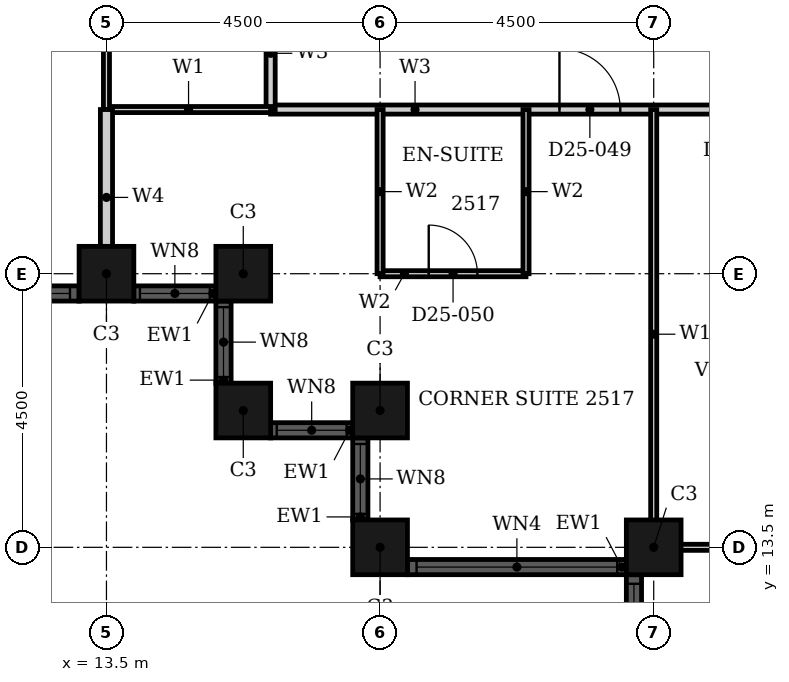
"""IFC4 building model, lengths in metres.
Left out: names, types, materials, properties, quantities, classifications, styles, units other than length and angle.
Written with IfcOpenShell. Run it as: python <this file> out.ifc"""

import sys

from ifc_helpers import new_model, si_unit, direction, frame, frame_2d, origin, origin_2d, place, context, subcontext, project, spatial, rectangle, hollow_rectangle, extrude, element, fill, save


model = new_model("IFC4")
c1 = context("Model", 3, precision=1e-05, world=origin(), true_north=direction((0.0, 1.0)))
c2 = subcontext(c1, "Body", "Model", "MODEL_VIEW")
j1 = project(units=[si_unit("LENGTHUNIT", "METRE"), si_unit("PLANEANGLEUNIT", "RADIAN")], contexts=[c1])
p1 = place(None, origin())
s1 = spatial("IfcSite", under=j1, at=p1, CompositionType="ELEMENT")
p2 = place(p1, origin())
s2 = spatial("IfcBuilding", under=s1, at=p2, CompositionType="ELEMENT")
p3 = place(p2, frame((0.0, 0.0, 104.4)))
s3 = spatial("IfcBuildingStorey", under=s2, at=p3, CompositionType="ELEMENT", Elevation=104.4)
for number, where, z_axis, x_axis in (
    (1, (13.5, 18.0, 0.0), (0.0, 0.0, 1.0), (1.0, 0.0, 0.0)),
    (2, (15.75, 18.0, 0.0), (0.0, 0.0, 1.0), (1.0, 0.0, 0.0)),
    (3, (15.75, 15.75, 0.0), (0.0, 0.0, 1.0), (1.0, 0.0, 0.0)),
    (4, (18.0, 15.75, 0.0), (0.0, 0.0, 1.0), (1.0, 0.0, 0.0)),
    (5, (18.0, 13.5, 0.0), (0.0, 0.0, 1.0), (1.0, 0.0, 0.0)),
    (6, (22.5, 13.5, 0.0), (0.0, 0.0, 1.0), (1.0, 0.0, 0.0)),
):
    element("IfcColumn", number, at=place(p3, frame(where, z_axis=z_axis, x_axis=x_axis)), inside=s3, PredefinedType="COLUMN", context=c2, shape_type="SweptSolid", body=[
        extrude(hollow_rectangle(XDim=0.9, YDim=0.9, WallThickness=0.028, at=origin_2d()), origin(), (0.0, 0.0, 1.0), 3.6),
    ])
p4 = place(p3, frame((4.95, 17.675, 0.0), z_axis=(0.0, 0.0, 1.0), x_axis=(1.0, 0.0, 0.0)))
e7 = element("IfcWall", 7, at=p4, inside=s3, PredefinedType="SOLIDWALL", context=c2, shape_type="SweptSolid", body=[
    extrude(rectangle(XDim=8.1, YDim=0.25, at=frame_2d((4.05, 0.0))), origin(), (0.0, 0.0, 1.0), 3.6),
])
p5 = place(p4, frame((0.15, 0.0, 0.9)))
e8 = element("IfcOpeningElement", 8, at=p5, cuts=e7, PredefinedType="OPENING", context=c2, shape_type="SweptSolid", body=[
    extrude(rectangle(XDim=3.3, YDim=2.08, at=frame_2d((1.65, 1.04))), frame((0.0, 0.135, 0.0), z_axis=(0.0, -1.0, 0.0), x_axis=(1.0, 0.0, 0.0)), (0.0, 0.0, 1.0), 0.27),
])
p6 = place(p4, frame((4.65, 0.0, 0.9)))
e9 = element("IfcOpeningElement", 9, at=p6, cuts=e7, PredefinedType="OPENING", context=c2, shape_type="SweptSolid", body=[
    extrude(rectangle(XDim=3.3, YDim=2.08, at=frame_2d((1.65, 1.04))), frame((0.0, 0.135, 0.0), z_axis=(0.0, -1.0, 0.0), x_axis=(1.0, 0.0, 0.0)), (0.0, 0.0, 1.0), 0.27),
])
p7 = place(p3, frame((13.95, 17.675, 0.0), z_axis=(0.0, 0.0, 1.0), x_axis=(1.0, 0.0, 0.0)))
e10 = element("IfcWall", 10, at=p7, inside=s3, PredefinedType="SOLIDWALL", context=c2, shape_type="SweptSolid", body=[
    extrude(rectangle(XDim=1.35, YDim=0.25, at=frame_2d((0.675, 0.0))), origin(), (0.0, 0.0, 1.0), 3.6),
])
p8 = place(p7, frame((0.1, 0.0, 0.9)))
e11 = element("IfcOpeningElement", 11, at=p8, cuts=e10, PredefinedType="OPENING", context=c2, shape_type="SweptSolid", body=[
    extrude(rectangle(XDim=1.15, YDim=2.08, at=frame_2d((0.575, 1.04))), frame((0.0, 0.135, 0.0), z_axis=(0.0, -1.0, 0.0), x_axis=(1.0, 0.0, 0.0)), (0.0, 0.0, 1.0), 0.27),
])
p9 = place(p3, frame((15.425, 17.55, 0.0), z_axis=(0.0, 0.0, 1.0), x_axis=(0.0, -1.0, 0.0)))
e12 = element("IfcWall", 12, at=p9, inside=s3, PredefinedType="SOLIDWALL", context=c2, shape_type="SweptSolid", body=[
    extrude(rectangle(XDim=1.35, YDim=0.25, at=frame_2d((0.675, 0.0))), origin(), (0.0, 0.0, 1.0), 3.6),
])
p10 = place(p9, frame((0.1, 0.0, 0.9)))
e13 = element("IfcOpeningElement", 13, at=p10, cuts=e12, PredefinedType="OPENING", context=c2, shape_type="SweptSolid", body=[
    extrude(rectangle(XDim=1.15, YDim=2.08, at=frame_2d((0.575, 1.04))), frame((0.0, 0.135, 0.0), z_axis=(0.0, -1.0, 0.0), x_axis=(1.0, 0.0, 0.0)), (0.0, 0.0, 1.0), 0.27),
])
p11 = place(p3, frame((16.2, 15.425, 0.0), z_axis=(0.0, 0.0, 1.0), x_axis=(1.0, 0.0, 0.0)))
e14 = element("IfcWall", 14, at=p11, inside=s3, PredefinedType="SOLIDWALL", context=c2, shape_type="SweptSolid", body=[
    extrude(rectangle(XDim=1.35, YDim=0.25, at=frame_2d((0.675, 0.0))), origin(), (0.0, 0.0, 1.0), 3.6),
])
p12 = place(p11, frame((0.1, 0.0, 0.9)))
e15 = element("IfcOpeningElement", 15, at=p12, cuts=e14, PredefinedType="OPENING", context=c2, shape_type="SweptSolid", body=[
    extrude(rectangle(XDim=1.15, YDim=2.08, at=frame_2d((0.575, 1.04))), frame((0.0, 0.135, 0.0), z_axis=(0.0, -1.0, 0.0), x_axis=(1.0, 0.0, 0.0)), (0.0, 0.0, 1.0), 0.27),
])
p13 = place(p3, frame((17.675, 15.3, 0.0), z_axis=(0.0, 0.0, 1.0), x_axis=(0.0, -1.0, 0.0)))
e16 = element("IfcWall", 16, at=p13, inside=s3, PredefinedType="SOLIDWALL", context=c2, shape_type="SweptSolid", body=[
    extrude(rectangle(XDim=1.35, YDim=0.25, at=frame_2d((0.675, 0.0))), origin(), (0.0, 0.0, 1.0), 3.6),
])
p14 = place(p13, frame((0.1, 0.0, 0.9)))
e17 = element("IfcOpeningElement", 17, at=p14, cuts=e16, PredefinedType="OPENING", context=c2, shape_type="SweptSolid", body=[
    extrude(rectangle(XDim=1.15, YDim=2.08, at=frame_2d((0.575, 1.04))), frame((0.0, 0.135, 0.0), z_axis=(0.0, -1.0, 0.0), x_axis=(1.0, 0.0, 0.0)), (0.0, 0.0, 1.0), 0.27),
])
p15 = place(p3, frame((18.45, 13.175, 0.0), z_axis=(0.0, 0.0, 1.0), x_axis=(1.0, 0.0, 0.0)))
e18 = element("IfcWall", 18, at=p15, inside=s3, PredefinedType="SOLIDWALL", context=c2, shape_type="SweptSolid", body=[
    extrude(rectangle(XDim=3.6, YDim=0.25, at=frame_2d((1.8, 0.0))), origin(), (0.0, 0.0, 1.0), 3.6),
])
p16 = place(p15, frame((0.15, 0.0, 0.9)))
e19 = element("IfcOpeningElement", 19, at=p16, cuts=e18, PredefinedType="OPENING", context=c2, shape_type="SweptSolid", body=[
    extrude(rectangle(XDim=3.3, YDim=2.08, at=frame_2d((1.65, 1.04))), frame((0.0, 0.135, 0.0), z_axis=(0.0, -1.0, 0.0), x_axis=(1.0, 0.0, 0.0)), (0.0, 0.0, 1.0), 0.27),
])
p17 = place(p3, frame((22.175, 13.05, 0.0), z_axis=(0.0, 0.0, 1.0), x_axis=(0.0, -1.0, 0.0)))
e20 = element("IfcWall", 20, at=p17, inside=s3, PredefinedType="SOLIDWALL", context=c2, shape_type="SweptSolid", body=[
    extrude(rectangle(XDim=8.1, YDim=0.25, at=frame_2d((4.05, 0.0))), origin(), (0.0, 0.0, 1.0), 3.6),
])
p18 = place(p17, frame((0.15, 0.0, 0.9)))
e21 = element("IfcOpeningElement", 21, at=p18, cuts=e20, PredefinedType="OPENING", context=c2, shape_type="SweptSolid", body=[
    extrude(rectangle(XDim=3.3, YDim=2.08, at=frame_2d((1.65, 1.04))), frame((0.0, 0.135, 0.0), z_axis=(0.0, -1.0, 0.0), x_axis=(1.0, 0.0, 0.0)), (0.0, 0.0, 1.0), 0.27),
])
p19 = place(p17, frame((4.65, 0.0, 0.9)))
e22 = element("IfcOpeningElement", 22, at=p19, cuts=e20, PredefinedType="OPENING", context=c2, shape_type="SweptSolid", body=[
    extrude(rectangle(XDim=3.3, YDim=2.08, at=frame_2d((1.65, 1.04))), frame((0.0, 0.135, 0.0), z_axis=(0.0, -1.0, 0.0), x_axis=(1.0, 0.0, 0.0)), (0.0, 0.0, 1.0), 0.27),
])
p20 = place(p3, frame((16.2, 20.7, 0.0), z_axis=(0.0, 0.0, 1.0), x_axis=(1.0, 0.0, 0.0)))
e23 = element("IfcWall", 23, at=p20, inside=s3, PredefinedType="PARTITIONING", context=c2, shape_type="SweptSolid", body=[
    extrude(rectangle(XDim=13.5, YDim=0.15, at=frame_2d((6.75, 0.0))), origin(), (0.0, 0.0, 1.0), 3.3),
])
p21 = place(p20, frame((4.75, 0.0, 0.0)))
e24 = element("IfcOpeningElement", 24, at=p21, cuts=e23, PredefinedType="OPENING", context=c2, shape_type="SweptSolid", body=[
    extrude(rectangle(XDim=1.0, YDim=2.1, at=frame_2d((0.5, 1.05))), frame((0.0, 0.085, 0.0), z_axis=(0.0, -1.0, 0.0), x_axis=(1.0, 0.0, 0.0)), (0.0, 0.0, 1.0), 0.17),
])
p22 = place(p20, frame((7.35, 0.0, 0.0)))
e25 = element("IfcOpeningElement", 25, at=p22, cuts=e23, PredefinedType="OPENING", context=c2, shape_type="SweptSolid", body=[
    extrude(rectangle(XDim=0.9, YDim=2.1, at=frame_2d((0.45, 1.05))), frame((0.0, 0.085, 0.0), z_axis=(0.0, -1.0, 0.0), x_axis=(1.0, 0.0, 0.0)), (0.0, 0.0, 1.0), 0.17),
])
p23 = place(p20, frame((10.95, 0.0, 0.0)))
e26 = element("IfcOpeningElement", 26, at=p23, cuts=e23, PredefinedType="OPENING", context=c2, shape_type="SweptSolid", body=[
    extrude(rectangle(XDim=0.9, YDim=2.1, at=frame_2d((0.45, 1.05))), frame((0.0, 0.085, 0.0), z_axis=(0.0, -1.0, 0.0), x_axis=(1.0, 0.0, 0.0)), (0.0, 0.0, 1.0), 0.17),
])
p24 = place(p3, frame((16.2, 20.7, 0.0), z_axis=(0.0, 0.0, 1.0), x_axis=(0.0, 1.0, 0.0)))
e27 = element("IfcWall", 27, at=p24, inside=s3, PredefinedType="PARTITIONING", context=c2, shape_type="SweptSolid", body=[
    extrude(rectangle(XDim=4.5, YDim=0.15, at=frame_2d((2.25, 0.0))), origin(), (0.0, 0.0, 1.0), 3.3),
])
p25 = place(p24, frame((1.85, 0.0, 0.0)))
e28 = element("IfcOpeningElement", 28, at=p25, cuts=e27, PredefinedType="OPENING", context=c2, shape_type="SweptSolid", body=[
    extrude(rectangle(XDim=0.9, YDim=2.1, at=frame_2d((0.45, 1.05))), frame((0.0, 0.085, 0.0), z_axis=(0.0, -1.0, 0.0), x_axis=(1.0, 0.0, 0.0)), (0.0, 0.0, 1.0), 0.17),
])
p26 = place(p3, frame((22.31, 13.5, 0.0), z_axis=(0.0, 0.0, 1.0), x_axis=(1.0, 0.0, 0.0)))
e29 = element("IfcWall", 29, at=p26, inside=s3, PredefinedType="PARTITIONING", context=c2, shape_type="SweptSolid", body=[
    extrude(rectangle(XDim=7.39, YDim=0.1, at=frame_2d((3.695, 0.0))), origin(), (0.0, 0.0, 1.0), 2.38),
])
p27 = place(p3, frame((13.5, 20.7, 0.0), z_axis=(0.0, 0.0, 1.0), x_axis=(1.0, 0.0, 0.0)))
e30 = element("IfcWall", 30, at=p27, inside=s3, PredefinedType="PARTITIONING", context=c2, shape_type="SweptSolid", body=[
    extrude(rectangle(XDim=2.7, YDim=0.1, at=frame_2d((1.35, 0.0))), origin(), (0.0, 0.0, 1.0), 3.3),
])
p28 = place(p3, frame((13.5, 20.7, 0.0), z_axis=(0.0, 0.0, 1.0), x_axis=(0.0, 1.0, 0.0)))
e31 = element("IfcWall", 31, at=p28, inside=s3, PredefinedType="PARTITIONING", context=c2, shape_type="SweptSolid", body=[
    extrude(rectangle(XDim=4.5, YDim=0.1, at=frame_2d((2.25, 0.0))), origin(), (0.0, 0.0, 1.0), 2.38),
])
p29 = place(p3, frame((22.5, 13.31, 0.0), z_axis=(0.0, 0.0, 1.0), x_axis=(0.0, 1.0, 0.0)))
e32 = element("IfcWall", 32, at=p29, inside=s3, PredefinedType="PARTITIONING", context=c2, shape_type="SweptSolid", body=[
    extrude(rectangle(XDim=7.39, YDim=0.1, at=frame_2d((3.695, 0.0))), origin(), (0.0, 0.0, 1.0), 3.3),
])
p30 = place(p3, frame((13.5, 17.81, 0.0), z_axis=(0.0, 0.0, 1.0), x_axis=(0.0, 1.0, 0.0)))
e33 = element("IfcWall", 33, at=p30, inside=s3, PredefinedType="PARTITIONING", context=c2, shape_type="SweptSolid", body=[
    extrude(rectangle(XDim=2.89, YDim=0.2, at=frame_2d((1.445, 0.0))), origin(), (0.0, 0.0, 1.0), 2.38),
])
p31 = place(p3, frame((18.0, 18.0, 0.0), z_axis=(0.0, 0.0, 1.0), x_axis=(1.0, 0.0, 0.0)))
e34 = element("IfcWall", 34, at=p31, inside=s3, PredefinedType="PARTITIONING", context=c2, shape_type="SweptSolid", body=[
    extrude(rectangle(XDim=2.4, YDim=0.1, at=frame_2d((1.2, 0.0))), origin(), (0.0, 0.0, 1.0), 3.3),
])
p32 = place(p31, frame((0.8, 0.0, 0.0)))
e35 = element("IfcOpeningElement", 35, at=p32, cuts=e34, PredefinedType="OPENING", context=c2, shape_type="SweptSolid", body=[
    extrude(rectangle(XDim=0.8, YDim=2.1, at=frame_2d((0.4, 1.05))), frame((0.0, 0.06, 0.0), z_axis=(0.0, -1.0, 0.0), x_axis=(1.0, 0.0, 0.0)), (0.0, 0.0, 1.0), 0.12),
])
for number, where, z_axis, x_axis in (
    (36, (18.0, 18.0, 0.0), (0.0, 0.0, 1.0), (0.0, 1.0, 0.0)),
    (37, (20.4, 18.0, 0.0), (0.0, 0.0, 1.0), (0.0, 1.0, 0.0)),
):
    element("IfcWall", number, at=place(p3, frame(where, z_axis=z_axis, x_axis=x_axis)), inside=s3, PredefinedType="PARTITIONING", context=c2, shape_type="SweptSolid", body=[
        extrude(rectangle(XDim=2.7, YDim=0.1, at=frame_2d((1.35, 0.0))), origin(), (0.0, 0.0, 1.0), 3.3),
    ])
p33 = place(p6, origin())
e38 = element("IfcWindow", 38, at=p33, inside=s3, PartitioningType="SINGLE_PANEL", PredefinedType="WINDOW", context=c2, shape_type="SweptSolid", body=[
    extrude(rectangle(XDim=3.3, YDim=2.08, at=frame_2d((1.65, 1.04))), frame((0.0, 0.03, 0.0), z_axis=(0.0, -1.0, 0.0), x_axis=(1.0, 0.0, 0.0)), (0.0, 0.0, 1.0), 0.06),
])
fill(e9, e38)
p34 = place(p8, origin())
e39 = element("IfcWindow", 39, at=p34, inside=s3, PartitioningType="SINGLE_PANEL", PredefinedType="WINDOW", context=c2, shape_type="SweptSolid", body=[
    extrude(rectangle(XDim=1.15, YDim=2.08, at=frame_2d((0.575, 1.04))), frame((0.0, 0.03, 0.0), z_axis=(0.0, -1.0, 0.0), x_axis=(1.0, 0.0, 0.0)), (0.0, 0.0, 1.0), 0.06),
])
fill(e11, e39)
p35 = place(p10, origin())
e40 = element("IfcWindow", 40, at=p35, inside=s3, PartitioningType="SINGLE_PANEL", PredefinedType="WINDOW", context=c2, shape_type="SweptSolid", body=[
    extrude(rectangle(XDim=1.15, YDim=2.08, at=frame_2d((0.575, 1.04))), frame((0.0, 0.03, 0.0), z_axis=(0.0, -1.0, 0.0), x_axis=(1.0, 0.0, 0.0)), (0.0, 0.0, 1.0), 0.06),
])
fill(e13, e40)
p36 = place(p12, origin())
e41 = element("IfcWindow", 41, at=p36, inside=s3, PartitioningType="SINGLE_PANEL", PredefinedType="WINDOW", context=c2, shape_type="SweptSolid", body=[
    extrude(rectangle(XDim=1.15, YDim=2.08, at=frame_2d((0.575, 1.04))), frame((0.0, 0.03, 0.0), z_axis=(0.0, -1.0, 0.0), x_axis=(1.0, 0.0, 0.0)), (0.0, 0.0, 1.0), 0.06),
])
fill(e15, e41)
p37 = place(p14, origin())
e42 = element("IfcWindow", 42, at=p37, inside=s3, PartitioningType="SINGLE_PANEL", PredefinedType="WINDOW", context=c2, shape_type="SweptSolid", body=[
    extrude(rectangle(XDim=1.15, YDim=2.08, at=frame_2d((0.575, 1.04))), frame((0.0, 0.03, 0.0), z_axis=(0.0, -1.0, 0.0), x_axis=(1.0, 0.0, 0.0)), (0.0, 0.0, 1.0), 0.06),
])
fill(e17, e42)
p38 = place(p16, origin())
e43 = element("IfcWindow", 43, at=p38, inside=s3, PartitioningType="SINGLE_PANEL", PredefinedType="WINDOW", context=c2, shape_type="SweptSolid", body=[
    extrude(rectangle(XDim=3.3, YDim=2.08, at=frame_2d((1.65, 1.04))), frame((0.0, 0.03, 0.0), z_axis=(0.0, -1.0, 0.0), x_axis=(1.0, 0.0, 0.0)), (0.0, 0.0, 1.0), 0.06),
])
fill(e19, e43)
p39 = place(p18, origin())
e44 = element("IfcWindow", 44, at=p39, inside=s3, PartitioningType="SINGLE_PANEL", PredefinedType="WINDOW", context=c2, shape_type="SweptSolid", body=[
    extrude(rectangle(XDim=3.3, YDim=2.08, at=frame_2d((1.65, 1.04))), frame((0.0, 0.03, 0.0), z_axis=(0.0, -1.0, 0.0), x_axis=(1.0, 0.0, 0.0)), (0.0, 0.0, 1.0), 0.06),
])
fill(e21, e44)
p40 = place(p21, origin())
e45 = element("IfcDoor", 45, at=p40, inside=s3, OperationType="SINGLE_SWING_RIGHT", PredefinedType="DOOR", context=c2, shape_type="SweptSolid", body=[
    extrude(rectangle(XDim=1.0, YDim=2.1, at=frame_2d((0.5, 1.05))), frame((0.0, 0.025, 0.0), z_axis=(0.0, -1.0, 0.0), x_axis=(1.0, 0.0, 0.0)), (0.0, 0.0, 1.0), 0.05),
])
fill(e24, e45)
p41 = place(p32, origin())
e46 = element("IfcDoor", 46, at=p41, inside=s3, OperationType="SINGLE_SWING_RIGHT", PredefinedType="DOOR", context=c2, shape_type="SweptSolid", body=[
    extrude(rectangle(XDim=0.8, YDim=2.1, at=frame_2d((0.4, 1.05))), frame((0.0, 0.025, 0.0), z_axis=(0.0, -1.0, 0.0), x_axis=(1.0, 0.0, 0.0)), (0.0, 0.0, 1.0), 0.05),
])
fill(e35, e46)
save(model, sys.argv[1])
